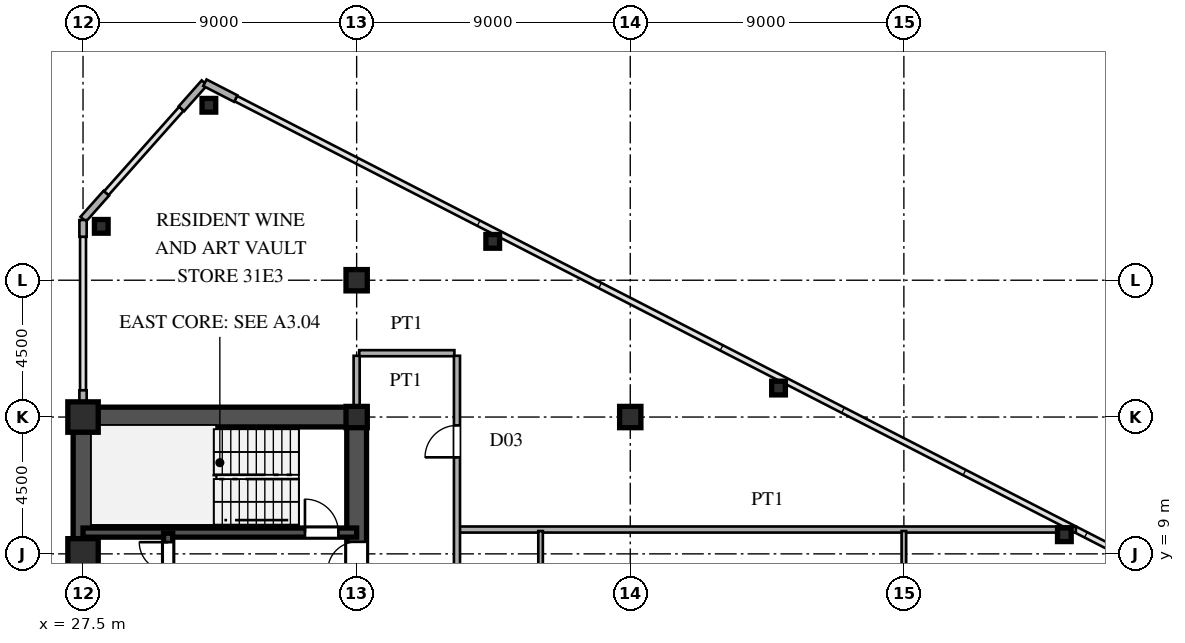
"""IFC4 building model, lengths in metres.
Left out: names, types, materials, properties, quantities, classifications, styles, units other than length and angle.
Written with IfcOpenShell. Run it as: python <this file> out.ifc"""

import sys

from ifc_helpers import new_model, si_unit, direction, frame, frame_2d, origin, origin_2d, place, context, subcontext, project, spatial, rectangle, hollow_rectangle, i_section, extrude, source, transform, mapped, element, fill, save


model = new_model("IFC4")
c1 = context("Model", 3, precision=1e-05, world=origin(), true_north=direction((0.0, 1.0)))
c2 = subcontext(c1, "Body", "Model", "MODEL_VIEW")
j1 = project(units=[si_unit("LENGTHUNIT", "METRE"), si_unit("PLANEANGLEUNIT", "RADIAN")], contexts=[c1])
p1 = place(None, origin())
s1 = spatial("IfcSite", under=j1, at=p1, CompositionType="ELEMENT")
p2 = place(p1, origin())
s2 = spatial("IfcBuilding", under=s1, at=p2, CompositionType="ELEMENT")
p3 = place(p2, frame((0.0, 0.0, 117.6)))
s3 = spatial("IfcBuildingStorey", under=s2, at=p3, CompositionType="ELEMENT", Elevation=117.6)
m1 = source(origin(), c2, "Body", "SweptSolid", [
    extrude(hollow_rectangle(XDim=1.0, YDim=1.0, WallThickness=0.042, at=origin_2d()), origin(), (0.0, 0.0, 1.0), 3.6),
])
for number, where, z_axis, x_axis in (
    (1, (27.5, 9.0, 0.0), (0.0, 0.0, 1.0), (1.0, 0.0, 0.0)),
    (2, (27.5, 13.5, 0.0), (0.0, 0.0, 1.0), (1.0, 0.0, 0.0)),
):
    element("IfcColumn", number, at=place(p3, frame(where, z_axis=z_axis, x_axis=x_axis)), inside=s3, PredefinedType="COLUMN", context=c2, shape_type="MappedRepresentation", body=[
        mapped(m1, transform((0.0, 0.0, 0.0), scale=1.0)),
    ])
m2 = source(origin(), c2, "Body", "SweptSolid", [
    extrude(i_section(OverallWidth=0.7, OverallDepth=0.7, WebThickness=0.028, FlangeThickness=0.045, at=origin_2d()), origin(), (0.0, 0.0, 1.0), 3.6),
])
for number, where, z_axis, x_axis in (
    (3, (36.5, 13.5, 0.0), (0.0, 0.0, 1.0), (1.0, 0.0, 0.0)),
    (4, (36.5, 18.0, 0.0), (0.0, 0.0, 1.0), (1.0, 0.0, 0.0)),
    (5, (45.5, 13.5, 0.0), (0.0, 0.0, 1.0), (1.0, 0.0, 0.0)),
):
    element("IfcColumn", number, at=place(p3, frame(where, z_axis=z_axis, x_axis=x_axis)), inside=s3, PredefinedType="COLUMN", context=c2, shape_type="MappedRepresentation", body=[
        mapped(m2, transform((0.0, 0.0, 0.0), scale=1.0)),
    ])
m3 = source(origin(), c2, "Body", "SweptSolid", [
    extrude(hollow_rectangle(XDim=0.45, YDim=0.45, WallThickness=0.018, at=origin_2d()), origin(), (0.0, 0.0, 1.0), 3.6),
])
for number, where, z_axis, x_axis in (
    (6, (31.64, 23.754, 0.0), (0.0, 0.0, 1.0), (1.0, 0.0, 0.0)),
    (7, (28.1, 19.772, 0.0), (0.0, 0.0, 1.0), (1.0, 0.0, 0.0)),
    (8, (40.976, 19.278, 0.0), (0.0, 0.0, 1.0), (1.0, 0.0, 0.0)),
    (9, (50.377, 14.453, 0.0), (0.0, 0.0, 1.0), (1.0, 0.0, 0.0)),
    (10, (59.779, 9.629, 0.0), (0.0, 0.0, 1.0), (1.0, 0.0, 0.0)),
):
    element("IfcColumn", number, at=place(p3, frame(where, z_axis=z_axis, x_axis=x_axis)), inside=s3, PredefinedType="COLUMN", context=c2, shape_type="MappedRepresentation", body=[
        mapped(m3, transform((0.0, 0.0, 0.0), scale=1.0)),
    ])
p4 = place(p3, frame((32.523, 23.975, 0.0), z_axis=(0.0, 0.0, 1.0), x_axis=(-0.889797395748, 0.456355776255, 0.0)))
e11 = element("IfcWall", 11, at=p4, inside=s3, PredefinedType="SOLIDWALL", context=c2, shape_type="SweptSolid", body=[
    extrude(rectangle(XDim=1.14, YDim=0.24, at=frame_2d((0.57, 0.0))), origin(), (0.0, 0.0, 1.0), 3.38),
])
for number, where, z_axis, x_axis in (
    (12, (31.493, 24.492, 0.0), (0.0, 0.0, 1.0), (-0.664, -0.747, 0.0)),
    (13, (28.264, 20.86, 0.0), (0.0, 0.0, 1.0), (-0.664, -0.747, 0.0)),
):
    element("IfcWall", number, at=place(p3, frame(where, z_axis=z_axis, x_axis=x_axis)), inside=s3, PredefinedType="SOLIDWALL", context=c2, shape_type="SweptSolid", body=[
        extrude(rectangle(XDim=1.14, YDim=0.24, at=frame_2d((0.57, 0.0))), origin(), (0.0, 0.0, 1.0), 3.38),
    ])
p5 = place(p3, frame((27.5, 13.83, 0.0), z_axis=(0.0, 0.0, 1.0), x_axis=(0.0, 1.0, 0.0)))
e14 = element("IfcWall", 14, at=p5, inside=s3, PredefinedType="SOLIDWALL", context=c2, shape_type="SweptSolid", body=[
    extrude(rectangle(XDim=0.55, YDim=0.24, at=frame_2d((0.275, 0.0))), origin(), (0.0, 0.0, 1.0), 2.88),
])
p6 = place(p3, frame((27.5, 19.43, 0.0), z_axis=(0.0, 0.0, 1.0), x_axis=(0.0, 1.0, 0.0)))
e15 = element("IfcWall", 15, at=p6, inside=s3, PredefinedType="SOLIDWALL", context=c2, shape_type="SweptSolid", body=[
    extrude(rectangle(XDim=0.55, YDim=0.24, at=frame_2d((0.275, 0.0))), origin(), (0.0, 0.0, 1.0), 3.38),
])
p7 = place(p3, frame((27.5, 1.3, 0.0), z_axis=(0.0, 0.0, 1.0), x_axis=(0.0, 1.0, 0.0)))
e16 = element("IfcWall", 16, at=p7, inside=s3, PredefinedType="SHEAR", context=c2, shape_type="SweptSolid", body=[
    extrude(rectangle(XDim=12.2, YDim=0.65, at=frame_2d((6.1, 0.0))), origin(), (0.0, 0.0, 1.0), 3.38),
])
p8 = place(p3, frame((27.5, 13.5, 0.0), z_axis=(0.0, 0.0, 1.0), x_axis=(1.0, 0.0, 0.0)))
e17 = element("IfcWall", 17, at=p8, inside=s3, PredefinedType="SHEAR", context=c2, shape_type="SweptSolid", body=[
    extrude(rectangle(XDim=9.0, YDim=0.65, at=frame_2d((4.5, 0.0))), origin(), (0.0, 0.0, 1.0), 3.38),
])
p9 = place(p3, frame((36.5, 8.2, 0.0), z_axis=(0.0, 0.0, 1.0), x_axis=(0.0, 1.0, 0.0)))
e18 = element("IfcWall", 18, at=p9, inside=s3, PredefinedType="SHEAR", context=c2, shape_type="SweptSolid", body=[
    extrude(rectangle(XDim=5.45, YDim=0.65, at=frame_2d((2.725, 0.0))), origin(), (0.0, 0.0, 1.0), 3.38),
])
p10 = place(p9, frame((0.245, 0.0, 0.0)))
e19 = element("IfcOpeningElement", 19, at=p10, cuts=e18, PredefinedType="OPENING", context=c2, shape_type="SweptSolid", body=[
    extrude(rectangle(XDim=0.95, YDim=2.15, at=frame_2d((0.475, 1.075))), frame((0.0, 0.335, 0.0), z_axis=(0.0, -1.0, 0.0), x_axis=(1.0, 0.0, 0.0)), (0.0, 0.0, 1.0), 0.67),
])
p11 = place(p3, frame((27.5, 9.7, 0.0), z_axis=(0.0, 0.0, 1.0), x_axis=(1.0, 0.0, 0.0)))
e20 = element("IfcWall", 20, at=p11, inside=s3, PredefinedType="SHEAR", context=c2, shape_type="SweptSolid", body=[
    extrude(rectangle(XDim=9.0, YDim=0.3, at=frame_2d((4.5, 0.0))), origin(), (0.0, 0.0, 1.0), 3.38),
])
p12 = place(p11, frame((7.3, 0.0, 0.0)))
e21 = element("IfcOpeningElement", 21, at=p12, cuts=e20, PredefinedType="OPENING", context=c2, shape_type="SweptSolid", body=[
    extrude(rectangle(XDim=1.1, YDim=2.2, at=frame_2d((0.55, 1.1))), frame((0.0, 0.16, 0.0), z_axis=(0.0, -1.0, 0.0), x_axis=(1.0, 0.0, 0.0)), (0.0, 0.0, 1.0), 0.32),
])
p13 = place(p3, frame((30.3, 8.15, 0.0), z_axis=(0.0, 0.0, 1.0), x_axis=(0.0, 1.0, 0.0)))
e22 = element("IfcWall", 22, at=p13, inside=s3, PredefinedType="SHEAR", context=c2, shape_type="SweptSolid", body=[
    extrude(rectangle(XDim=1.53, YDim=0.3, at=frame_2d((0.765, 0.0))), origin(), (0.0, 0.0, 1.0), 3.38),
])
p14 = place(p13, frame((0.285, 0.0, 0.0)))
e23 = element("IfcOpeningElement", 23, at=p14, cuts=e22, PredefinedType="OPENING", context=c2, shape_type="SweptSolid", body=[
    extrude(rectangle(XDim=0.95, YDim=2.15, at=frame_2d((0.475, 1.075))), frame((0.0, 0.16, 0.0), z_axis=(0.0, -1.0, 0.0), x_axis=(1.0, 0.0, 0.0)), (0.0, 0.0, 1.0), 0.32),
])
p15 = place(p3, frame((39.88, 9.8, 0.0), z_axis=(0.0, 0.0, 1.0), x_axis=(1.0, 0.0, 0.0)))
e24 = element("IfcWall", 24, at=p15, inside=s3, PredefinedType="PARTITIONING", context=c2, shape_type="SweptSolid", body=[
    extrude(rectangle(XDim=20.277, YDim=0.2, at=frame_2d((10.139, 0.0))), origin(), (0.0, 0.0, 1.0), 3.38),
])
p16 = place(p3, frame((36.585, 15.6, 0.0), z_axis=(0.0, 0.0, 1.0), x_axis=(1.0, 0.0, 0.0)))
e25 = element("IfcWall", 25, at=p16, inside=s3, PredefinedType="PARTITIONING", context=c2, shape_type="SweptSolid", body=[
    extrude(rectangle(XDim=3.13, YDim=0.2, at=frame_2d((1.565, 0.0))), origin(), (0.0, 0.0, 1.0), 3.38),
])
p17 = place(p3, frame((36.5, 13.83, 0.0), z_axis=(0.0, 0.0, 1.0), x_axis=(0.0, 1.0, 0.0)))
e26 = element("IfcWall", 26, at=p17, inside=s3, PredefinedType="PARTITIONING", context=c2, shape_type="SweptSolid", body=[
    extrude(rectangle(XDim=1.685, YDim=0.2, at=frame_2d((0.842, 0.0))), origin(), (0.0, 0.0, 1.0), 2.78),
])
p18 = place(p3, frame((39.8, -15.515, 0.0), z_axis=(0.0, 0.0, 1.0), x_axis=(0.0, 1.0, 0.0)))
e27 = element("IfcWall", 27, at=p18, inside=s3, PredefinedType="PARTITIONING", context=c2, shape_type="SweptSolid", body=[
    extrude(rectangle(XDim=31.03, YDim=0.2, at=frame_2d((15.515, 0.0))), origin(), (0.0, 0.0, 1.0), 3.38),
])
p19 = place(p18, frame((5.762, 0.0, 0.0)))
e28 = element("IfcOpeningElement", 28, at=p19, cuts=e27, PredefinedType="OPENING", context=c2, shape_type="SweptSolid", body=[
    extrude(rectangle(XDim=1.05, YDim=2.25, at=frame_2d((0.525, 1.125))), frame((0.0, 0.11, 0.0), z_axis=(0.0, -1.0, 0.0), x_axis=(1.0, 0.0, 0.0)), (0.0, 0.0, 1.0), 0.22),
])
p20 = place(p18, frame((18.301, 0.0, 0.0)))
e29 = element("IfcOpeningElement", 29, at=p20, cuts=e27, PredefinedType="OPENING", context=c2, shape_type="SweptSolid", body=[
    extrude(rectangle(XDim=1.05, YDim=2.25, at=frame_2d((0.525, 1.125))), frame((0.0, 0.11, 0.0), z_axis=(0.0, -1.0, 0.0), x_axis=(1.0, 0.0, 0.0)), (0.0, 0.0, 1.0), 0.22),
])
p21 = place(p18, frame((27.69, 0.0, 0.0)))
e30 = element("IfcOpeningElement", 30, at=p21, cuts=e27, PredefinedType="OPENING", context=c2, shape_type="SweptSolid", body=[
    extrude(rectangle(XDim=1.05, YDim=2.25, at=frame_2d((0.525, 1.125))), frame((0.0, 0.11, 0.0), z_axis=(0.0, -1.0, 0.0), x_axis=(1.0, 0.0, 0.0)), (0.0, 0.0, 1.0), 0.22),
])
p22 = place(p3, frame((42.55, 6.072, 0.0), z_axis=(0.0, 0.0, 1.0), x_axis=(0.0, 1.0, 0.0)))
e31 = element("IfcWall", 31, at=p22, inside=s3, PredefinedType="PARTITIONING", context=c2, shape_type="SweptSolid", body=[
    extrude(rectangle(XDim=3.678, YDim=0.15, at=frame_2d((1.839, 0.0))), origin(), (0.0, 0.0, 1.0), 3.38),
])
p23 = place(p3, frame((54.5, -12.732, 0.0), z_axis=(0.0, 0.0, 1.0), x_axis=(0.0, 1.0, 0.0)))
e32 = element("IfcWall", 32, at=p23, inside=s3, PredefinedType="PARTITIONING", context=c2, shape_type="SweptSolid", body=[
    extrude(rectangle(XDim=22.482, YDim=0.15, at=frame_2d((11.241, 0.0))), origin(), (0.0, 0.0, 1.0), 2.78),
])
p24 = place(p23, frame((1.837, 0.0, 0.0)))
e33 = element("IfcOpeningElement", 33, at=p24, cuts=e32, PredefinedType="OPENING", context=c2, shape_type="SweptSolid", body=[
    extrude(rectangle(XDim=0.95, YDim=2.15, at=frame_2d((0.475, 1.075))), frame((0.0, 0.085, 0.0), z_axis=(0.0, -1.0, 0.0), x_axis=(1.0, 0.0, 0.0)), (0.0, 0.0, 1.0), 0.17),
])
p25 = place(p23, frame((6.785, 0.0, 0.0)))
e34 = element("IfcOpeningElement", 34, at=p25, cuts=e32, PredefinedType="OPENING", context=c2, shape_type="SweptSolid", body=[
    extrude(rectangle(XDim=0.95, YDim=2.15, at=frame_2d((0.475, 1.075))), frame((0.0, 0.085, 0.0), z_axis=(0.0, -1.0, 0.0), x_axis=(1.0, 0.0, 0.0)), (0.0, 0.0, 1.0), 0.17),
])
p26 = place(p23, frame((15.757, 0.0, 0.0)))
e35 = element("IfcOpeningElement", 35, at=p26, cuts=e32, PredefinedType="OPENING", context=c2, shape_type="SweptSolid", body=[
    extrude(rectangle(XDim=0.95, YDim=2.15, at=frame_2d((0.475, 1.075))), frame((0.0, 0.085, 0.0), z_axis=(0.0, -1.0, 0.0), x_axis=(1.0, 0.0, 0.0)), (0.0, 0.0, 1.0), 0.17),
])
m4 = source(origin(), c2, "Body", "SweptSolid", [
    extrude(rectangle(XDim=0.95, YDim=2.15, at=frame_2d((0.475, 1.075))), frame((0.0, 0.025, 0.0), z_axis=(0.0, -1.0, 0.0), x_axis=(1.0, 0.0, 0.0)), (0.0, 0.0, 1.0), 0.05),
])
p27 = place(p10, origin())
e36 = element("IfcDoor", 36, at=p27, inside=s3, OperationType="SINGLE_SWING_LEFT", PredefinedType="DOOR", context=c2, shape_type="MappedRepresentation", body=[
    mapped(m4, transform((0.0, 0.0, 0.0), scale=1.0)),
])
fill(e19, e36)
m5 = source(origin(), c2, "Body", "SweptSolid", [
    extrude(rectangle(XDim=1.1, YDim=2.2, at=frame_2d((0.55, 1.1))), frame((0.0, 0.025, 0.0), z_axis=(0.0, -1.0, 0.0), x_axis=(1.0, 0.0, 0.0)), (0.0, 0.0, 1.0), 0.05),
])
p28 = place(p12, origin())
e37 = element("IfcDoor", 37, at=p28, inside=s3, OperationType="SINGLE_SWING_LEFT", PredefinedType="DOOR", context=c2, shape_type="MappedRepresentation", body=[
    mapped(m5, transform((0.0, 0.0, 0.0), scale=1.0)),
])
fill(e21, e37)
p29 = place(p14, origin())
e38 = element("IfcDoor", 38, at=p29, inside=s3, OperationType="SINGLE_SWING_RIGHT", PredefinedType="DOOR", context=c2, shape_type="MappedRepresentation", body=[
    mapped(m4, transform((0.0, 0.0, 0.0), scale=1.0)),
])
fill(e23, e38)
m6 = source(origin(), c2, "Body", "SweptSolid", [
    extrude(rectangle(XDim=1.05, YDim=2.25, at=frame_2d((0.525, 1.125))), frame((0.0, 0.025, 0.0), z_axis=(0.0, -1.0, 0.0), x_axis=(1.0, 0.0, 0.0)), (0.0, 0.0, 1.0), 0.05),
])
p30 = place(p21, origin())
e39 = element("IfcDoor", 39, at=p30, inside=s3, OperationType="SINGLE_SWING_LEFT", PredefinedType="DOOR", context=c2, shape_type="MappedRepresentation", body=[
    mapped(m6, transform((0.0, 0.0, 0.0), scale=1.0)),
])
fill(e30, e39)
save(model, sys.argv[1])
